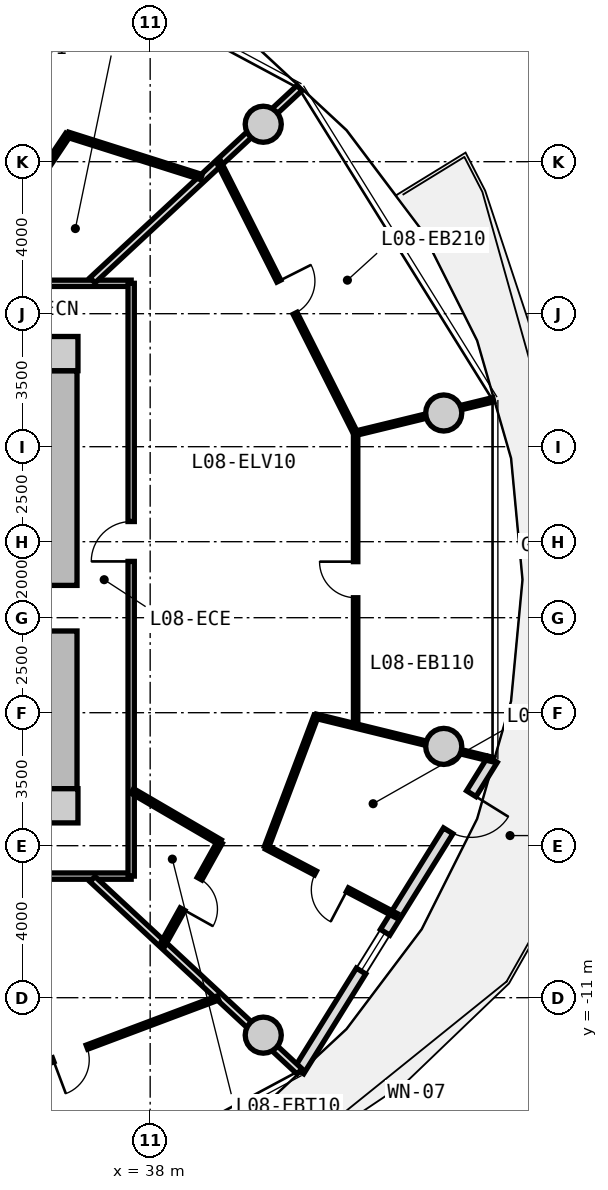
"""IFC4 building model, lengths in metres.
Left out: names, types, materials, properties, quantities, classifications, styles, units other than length and angle.
Written with IfcOpenShell. Run it as: python <this file> out.ifc"""

import sys

from ifc_helpers import new_model, si_unit, direction, frame, frame_2d, origin, origin_2d, place, context, subcontext, project, spatial, rectangle, circle, extrude, source, transform, mapped, element, fill, save


model = new_model("IFC4")
c1 = context("Model", 3, precision=1e-05, world=origin(), true_north=direction((0.0, 1.0)))
c2 = subcontext(c1, "Body", "Model", "MODEL_VIEW")
j1 = project(units=[si_unit("LENGTHUNIT", "METRE"), si_unit("PLANEANGLEUNIT", "RADIAN")], contexts=[c1])
p1 = place(None, origin())
s1 = spatial("IfcSite", under=j1, at=p1, CompositionType="ELEMENT")
p2 = place(p1, origin())
s2 = spatial("IfcBuilding", under=s1, at=p2, CompositionType="ELEMENT")
p3 = place(p2, frame((0.0, 0.0, 30.75)))
s3 = spatial("IfcBuildingStorey", under=s2, at=p3, CompositionType="ELEMENT", Elevation=30.75)
m1 = source(origin(), c2, "Body", "SweptSolid", [
    extrude(rectangle(XDim=0.9, YDim=0.9, at=origin_2d()), origin(), (0.0, 0.0, 1.0), 3.05),
])
for number, where, z_axis, x_axis in (
    (1, (35.65, -5.95, 0.0), (0.0, 0.0, 1.0), (1.0, 0.0, 0.0)),
    (2, (35.65, 5.95, 0.0), (0.0, 0.0, 1.0), (1.0, 0.0, 0.0)),
):
    element("IfcColumn", number, at=place(p3, frame(where, z_axis=z_axis, x_axis=x_axis)), inside=s3, PredefinedType="COLUMN", context=c2, shape_type="MappedRepresentation", body=[
        mapped(m1, transform((0.0, 0.0, 0.0), x_axis=(1.0, 0.0, 0.0), y_axis=(0.0, 1.0, 0.0), z_axis=(0.0, 0.0, 1.0), scale=1.0)),
    ])
m2 = source(origin(), c2, "Body", "SweptSolid", [
    extrude(rectangle(XDim=11.0, YDim=0.85, at=frame_2d((5.5, 0.0))), origin(), (0.0, 0.0, 1.0), 2.79),
])
p4 = place(p3, frame((35.65, 5.5, 0.0), z_axis=(0.0, 0.0, 1.0), x_axis=(0.0, -1.0, 0.0)))
e3 = element("IfcWall", 3, at=p4, inside=s3, PredefinedType="SHEAR", context=c2, shape_type="MappedRepresentation", body=[
    mapped(m2, transform((0.0, 0.0, 0.0), x_axis=(1.0, 0.0, 0.0), y_axis=(0.0, 1.0, 0.0), z_axis=(0.0, 0.0, 1.0), scale=1.0)),
])
p5 = place(p4, frame((5.65, 0.0, 0.0)))
e4 = element("IfcOpeningElement", 4, at=p5, cuts=e3, PredefinedType="OPENING", context=c2, shape_type="SweptSolid", body=[
    extrude(rectangle(XDim=1.2, YDim=2.15, at=frame_2d((0.6, 1.075))), frame((0.0, 0.435, 0.0), z_axis=(0.0, -1.0, 0.0), x_axis=(1.0, 0.0, 0.0)), (0.0, 0.0, 1.0), 0.87),
])
m3 = source(origin(), c2, "Body", "SweptSolid", [
    extrude(circle(Radius=0.475, at=origin_2d()), origin(), (0.0, 0.0, 1.0), 3.05),
])
for number, where, z_axis, x_axis in (
    (5, (45.725, 4.387, 0.0), (0.0, 0.0, 1.0), (1.0, 0.0, 0.0)),
    (6, (40.975, 11.985, 0.0), (0.0, 0.0, 1.0), (1.0, 0.0, 0.0)),
    (7, (40.975, -11.985, 0.0), (0.0, 0.0, 1.0), (1.0, 0.0, 0.0)),
    (8, (45.725, -4.387, 0.0), (0.0, 0.0, 1.0), (1.0, 0.0, 0.0)),
):
    element("IfcColumn", number, at=place(p3, frame(where, z_axis=z_axis, x_axis=x_axis)), inside=s3, PredefinedType="COLUMN", context=c2, shape_type="MappedRepresentation", body=[
        mapped(m3, transform((0.0, 0.0, 0.0), x_axis=(1.0, 0.0, 0.0), y_axis=(0.0, 1.0, 0.0), z_axis=(0.0, 0.0, 1.0), scale=1.0)),
    ])
m4 = source(origin(), c2, "Body", "SweptSolid", [
    extrude(rectangle(XDim=9.649, YDim=0.29, at=frame_2d((4.824, 0.0))), origin(), (0.0, 0.0, 1.0), 2.79),
])
p6 = place(p3, frame((47.01, -4.731, 0.0), z_axis=(0.0, 0.0, 1.0), x_axis=(-0.527909458386, -0.849300655684, 0.0)))
e9 = element("IfcWall", 9, at=p6, inside=s3, PredefinedType="SOLIDWALL", context=c2, shape_type="MappedRepresentation", body=[
    mapped(m4, transform((0.0, 0.0, 0.0), x_axis=(1.0, 0.0, 0.0), y_axis=(0.0, 1.0, 0.0), z_axis=(0.0, 0.0, 1.0), scale=1.0)),
])
p7 = place(p6, frame((1.06, 0.0, 0.0)))
e10 = element("IfcOpeningElement", 10, at=p7, cuts=e9, PredefinedType="OPENING", context=c2, shape_type="SweptSolid", body=[
    extrude(rectangle(XDim=1.15, YDim=2.25, at=frame_2d((0.575, 1.125))), frame((0.0, 0.155, 0.0), z_axis=(0.0, -1.0, 0.0), x_axis=(1.0, 0.0, 0.0)), (0.0, 0.0, 1.0), 0.31),
])
p8 = place(p6, frame((5.354, 0.0, 0.85)))
e11 = element("IfcOpeningElement", 11, at=p8, cuts=e9, PredefinedType="OPENING", context=c2, shape_type="SweptSolid", body=[
    extrude(rectangle(XDim=1.2, YDim=1.5, at=frame_2d((0.6, 0.75))), frame((0.0, 0.155, 0.0), z_axis=(0.0, -1.0, 0.0), x_axis=(1.0, 0.0, 0.0)), (0.0, 0.0, 1.0), 0.31),
])
m5 = source(origin(), c2, "Body", "SweptSolid", [
    extrude(rectangle(XDim=19.0, YDim=0.165, at=frame_2d((9.5, 0.0))), origin(), (0.0, 0.0, 1.0), 2.775),
])
p9 = place(p3, frame((18.5, 7.8, 0.0), z_axis=(0.0, 0.0, 1.0), x_axis=(1.0, 0.0, 0.0)))
e12 = element("IfcWall", 12, at=p9, inside=s3, PredefinedType="PARTITIONING", context=c2, shape_type="MappedRepresentation", body=[
    mapped(m5, transform((0.0, 0.0, 0.0), x_axis=(1.0, 0.0, 0.0), y_axis=(0.0, 1.0, 0.0), z_axis=(0.0, 0.0, 1.0), scale=1.0)),
])
p10 = place(p9, frame((10.523, 0.0, 0.0)))
e13 = element("IfcOpeningElement", 13, at=p10, cuts=e12, PredefinedType="OPENING", context=c2, shape_type="SweptSolid", body=[
    extrude(rectangle(XDim=0.92, YDim=2.1, at=frame_2d((0.46, 1.05))), frame((0.0, 0.093, 0.0), z_axis=(0.0, -1.0, 0.0), x_axis=(1.0, 0.0, 0.0)), (0.0, 0.0, 1.0), 0.185),
])
p11 = place(p9, frame((8.226, 0.0, 0.0)))
e14 = element("IfcOpeningElement", 14, at=p11, cuts=e12, PredefinedType="OPENING", context=c2, shape_type="SweptSolid", body=[
    extrude(rectangle(XDim=0.92, YDim=2.1, at=frame_2d((0.46, 1.05))), frame((0.0, 0.093, 0.0), z_axis=(0.0, -1.0, 0.0), x_axis=(1.0, 0.0, 0.0)), (0.0, 0.0, 1.0), 0.185),
])
p12 = place(p9, frame((3.506, 0.0, 0.0)))
e15 = element("IfcOpeningElement", 15, at=p12, cuts=e12, PredefinedType="OPENING", context=c2, shape_type="SweptSolid", body=[
    extrude(rectangle(XDim=1.25, YDim=2.2, at=frame_2d((0.625, 1.1))), frame((0.0, 0.093, 0.0), z_axis=(0.0, -1.0, 0.0), x_axis=(1.0, 0.0, 0.0)), (0.0, 0.0, 1.0), 0.185),
])
p13 = place(p9, frame((12.706, 0.0, 0.0)))
e16 = element("IfcOpeningElement", 16, at=p13, cuts=e12, PredefinedType="OPENING", context=c2, shape_type="SweptSolid", body=[
    extrude(rectangle(XDim=1.05, YDim=2.15, at=frame_2d((0.525, 1.075))), frame((0.0, 0.093, 0.0), z_axis=(0.0, -1.0, 0.0), x_axis=(1.0, 0.0, 0.0)), (0.0, 0.0, 1.0), 0.185),
])
p14 = place(p3, frame((37.5, -7.8, 0.0), z_axis=(0.0, 0.0, 1.0), x_axis=(-1.0, 0.0, 0.0)))
e17 = element("IfcWall", 17, at=p14, inside=s3, PredefinedType="PARTITIONING", context=c2, shape_type="MappedRepresentation", body=[
    mapped(m5, transform((0.0, 0.0, 0.0), x_axis=(1.0, 0.0, 0.0), y_axis=(0.0, 1.0, 0.0), z_axis=(0.0, 0.0, 1.0), scale=1.0)),
])
p15 = place(p14, frame((7.336, 0.0, 0.0)))
e18 = element("IfcOpeningElement", 18, at=p15, cuts=e17, PredefinedType="OPENING", context=c2, shape_type="SweptSolid", body=[
    extrude(rectangle(XDim=1.05, YDim=2.15, at=frame_2d((0.525, 1.075))), frame((0.0, 0.093, 0.0), z_axis=(0.0, -1.0, 0.0), x_axis=(1.0, 0.0, 0.0)), (0.0, 0.0, 1.0), 0.185),
])
m6 = source(origin(), c2, "Body", "SweptSolid", [
    extrude(rectangle(XDim=15.6, YDim=0.165, at=frame_2d((7.8, 0.0))), origin(), (0.0, 0.0, 1.0), 2.775),
])
p16 = place(p3, frame((37.5, 7.8, 0.0), z_axis=(0.0, 0.0, 1.0), x_axis=(0.0, -1.0, 0.0)))
e19 = element("IfcWall", 19, at=p16, inside=s3, PredefinedType="PARTITIONING", context=c2, shape_type="MappedRepresentation", body=[
    mapped(m6, transform((0.0, 0.0, 0.0), x_axis=(1.0, 0.0, 0.0), y_axis=(0.0, 1.0, 0.0), z_axis=(0.0, 0.0, 1.0), scale=1.0)),
])
p17 = place(p16, frame((6.269, 0.0, 0.0)))
e20 = element("IfcOpeningElement", 20, at=p17, cuts=e19, PredefinedType="OPENING", context=c2, shape_type="SweptSolid", body=[
    extrude(rectangle(XDim=1.05, YDim=2.15, at=frame_2d((0.525, 1.075))), frame((0.0, 0.093, 0.0), z_axis=(0.0, -1.0, 0.0), x_axis=(1.0, 0.0, 0.0)), (0.0, 0.0, 1.0), 0.185),
])
m7 = source(origin(), c2, "Body", "SweptSolid", [
    extrude(rectangle(XDim=7.435, YDim=0.19, at=frame_2d((3.717, 0.0))), origin(), (0.0, 0.0, 1.0), 2.415),
])
p18 = place(p3, frame((36.483, -7.88, 0.0), z_axis=(0.0, 0.0, 1.0), x_axis=(0.732651956848, -0.680603489652, 0.0)))
e21 = element("IfcWall", 21, at=p18, inside=s3, PredefinedType="PARTITIONING", context=c2, shape_type="MappedRepresentation", body=[
    mapped(m7, transform((0.0, 0.0, 0.0), x_axis=(1.0, 0.0, 0.0), y_axis=(0.0, 1.0, 0.0), z_axis=(0.0, 0.0, 1.0), scale=1.0)),
])
m8 = source(origin(), c2, "Body", "SweptSolid", [
    extrude(rectangle(XDim=8.32, YDim=0.115, at=frame_2d((4.16, 0.0))), origin(), (0.0, 0.0, 1.0), 2.775),
])
p19 = place(p3, frame((31.997, -13.93, 0.0), z_axis=(0.0, 0.0, 1.0), x_axis=(0.936180763098, 0.351518959382, 0.0)))
e22 = element("IfcWall", 22, at=p19, inside=s3, PredefinedType="PARTITIONING", context=c2, shape_type="MappedRepresentation", body=[
    mapped(m8, transform((0.0, 0.0, 0.0), x_axis=(1.0, 0.0, 0.0), y_axis=(0.0, 1.0, 0.0), z_axis=(0.0, 0.0, 1.0), scale=1.0)),
])
p20 = place(p19, frame((3.685, 0.0, 0.0)))
e23 = element("IfcOpeningElement", 23, at=p20, cuts=e22, PredefinedType="OPENING", context=c2, shape_type="SweptSolid", body=[
    extrude(rectangle(XDim=0.95, YDim=2.1, at=frame_2d((0.475, 1.05))), frame((0.0, 0.067, 0.0), z_axis=(0.0, -1.0, 0.0), x_axis=(1.0, 0.0, 0.0)), (0.0, 0.0, 1.0), 0.135),
])
m9 = source(origin(), c2, "Body", "SweptSolid", [
    extrude(rectangle(XDim=7.435, YDim=0.19, at=frame_2d((3.717, 0.0))), origin(), (0.0, 0.0, 1.0), 2.225),
])
p21 = place(p3, frame((36.483, 7.88, 0.0), z_axis=(0.0, 0.0, 1.0), x_axis=(0.732651956848, 0.680603489652, 0.0)))
e24 = element("IfcWall", 24, at=p21, inside=s3, PredefinedType="PARTITIONING", context=c2, shape_type="MappedRepresentation", body=[
    mapped(m9, transform((0.0, 0.0, 0.0), x_axis=(1.0, 0.0, 0.0), y_axis=(0.0, 1.0, 0.0), z_axis=(0.0, 0.0, 1.0), scale=1.0)),
])
m10 = source(origin(), c2, "Body", "SweptSolid", [
    extrude(rectangle(XDim=7.709, YDim=0.115, at=frame_2d((3.855, 0.0))), origin(), (0.0, 0.0, 1.0), 2.775),
])
p22 = place(p3, frame((43.406, -3.855, 0.0), z_axis=(0.0, 0.0, 1.0), x_axis=(0.0, 1.0, 0.0)))
e25 = element("IfcWall", 25, at=p22, inside=s3, PredefinedType="PARTITIONING", context=c2, shape_type="MappedRepresentation", body=[
    mapped(m10, transform((0.0, 0.0, 0.0), x_axis=(1.0, 0.0, 0.0), y_axis=(0.0, 1.0, 0.0), z_axis=(0.0, 0.0, 1.0), scale=1.0)),
])
p23 = place(p22, frame((3.38, 0.0, 0.0)))
e26 = element("IfcOpeningElement", 26, at=p23, cuts=e25, PredefinedType="OPENING", context=c2, shape_type="SweptSolid", body=[
    extrude(rectangle(XDim=0.95, YDim=2.1, at=frame_2d((0.475, 1.05))), frame((0.0, 0.067, 0.0), z_axis=(0.0, -1.0, 0.0), x_axis=(1.0, 0.0, 0.0)), (0.0, 0.0, 1.0), 0.135),
])
m11 = source(origin(), c2, "Body", "SweptSolid", [
    extrude(rectangle(XDim=4.803, YDim=0.115, at=frame_2d((2.401, 0.0))), origin(), (0.0, 0.0, 1.0), 2.225),
])
p24 = place(p3, frame((42.364, -3.594, 0.0), z_axis=(0.0, 0.0, 1.0), x_axis=(0.97129155908, -0.237892217736, 0.0)))
e27 = element("IfcWall", 27, at=p24, inside=s3, PredefinedType="PARTITIONING", context=c2, shape_type="MappedRepresentation", body=[
    mapped(m11, transform((0.0, 0.0, 0.0), x_axis=(1.0, 0.0, 0.0), y_axis=(0.0, 1.0, 0.0), z_axis=(0.0, 0.0, 1.0), scale=1.0)),
])
m12 = source(origin(), c2, "Body", "SweptSolid", [
    extrude(rectangle(XDim=8.018, YDim=0.115, at=frame_2d((4.009, 0.0))), origin(), (0.0, 0.0, 1.0), 2.775),
])
p25 = place(p3, frame((43.404, 3.854, 0.0), z_axis=(0.0, 0.0, 1.0), x_axis=(-0.450134355233, 0.89296084026, 0.0)))
e28 = element("IfcWall", 28, at=p25, inside=s3, PredefinedType="PARTITIONING", context=c2, shape_type="MappedRepresentation", body=[
    mapped(m12, transform((0.0, 0.0, 0.0), x_axis=(1.0, 0.0, 0.0), y_axis=(0.0, 1.0, 0.0), z_axis=(0.0, 0.0, 1.0), scale=1.0)),
])
p26 = place(p25, frame((3.534, 0.0, 0.0)))
e29 = element("IfcOpeningElement", 29, at=p26, cuts=e28, PredefinedType="OPENING", context=c2, shape_type="SweptSolid", body=[
    extrude(rectangle(XDim=0.95, YDim=2.1, at=frame_2d((0.475, 1.05))), frame((0.0, 0.067, 0.0), z_axis=(0.0, -1.0, 0.0), x_axis=(1.0, 0.0, 0.0)), (0.0, 0.0, 1.0), 0.135),
])
m13 = source(origin(), c2, "Body", "SweptSolid", [
    extrude(rectangle(XDim=3.73, YDim=0.115, at=frame_2d((1.865, 0.0))), origin(), (0.0, 0.0, 1.0), 2.225),
])
p27 = place(p3, frame((43.404, 3.854, 0.0), z_axis=(0.0, 0.0, 1.0), x_axis=(0.971644038568, 0.236448434791, 0.0)))
e30 = element("IfcWall", 30, at=p27, inside=s3, PredefinedType="PARTITIONING", context=c2, shape_type="MappedRepresentation", body=[
    mapped(m13, transform((0.0, 0.0, 0.0), x_axis=(1.0, 0.0, 0.0), y_axis=(0.0, 1.0, 0.0), z_axis=(0.0, 0.0, 1.0), scale=1.0)),
])
m14 = source(origin(), c2, "Body", "SweptSolid", [
    extrude(rectangle(XDim=2.669, YDim=0.14, at=frame_2d((1.335, 0.0))), origin(), (0.0, 0.0, 1.0), 2.775),
])
p28 = place(p3, frame((37.53, -5.561, 0.0), z_axis=(0.0, 0.0, 1.0), x_axis=(0.86369928178, -0.50400749067, 0.0)))
e31 = element("IfcWall", 31, at=p28, inside=s3, PredefinedType="PARTITIONING", context=c2, shape_type="MappedRepresentation", body=[
    mapped(m14, transform((0.0, 0.0, 0.0), x_axis=(1.0, 0.0, 0.0), y_axis=(0.0, 1.0, 0.0), z_axis=(0.0, 0.0, 1.0), scale=1.0)),
])
m15 = source(origin(), c2, "Body", "SweptSolid", [
    extrude(rectangle(XDim=3.121, YDim=0.14, at=frame_2d((1.561, 0.0))), origin(), (0.0, 0.0, 1.0), 2.775),
])
p29 = place(p3, frame((39.836, -6.906, 0.0), z_axis=(0.0, 0.0, 1.0), x_axis=(-0.487302357327, -0.873233309342, 0.0)))
e32 = element("IfcWall", 32, at=p29, inside=s3, PredefinedType="PARTITIONING", context=c2, shape_type="MappedRepresentation", body=[
    mapped(m15, transform((0.0, 0.0, 0.0), x_axis=(1.0, 0.0, 0.0), y_axis=(0.0, 1.0, 0.0), z_axis=(0.0, 0.0, 1.0), scale=1.0)),
])
p30 = place(p29, frame((1.101, 0.0, 0.0)))
e33 = element("IfcOpeningElement", 33, at=p30, cuts=e32, PredefinedType="OPENING", context=c2, shape_type="SweptSolid", body=[
    extrude(rectangle(XDim=0.92, YDim=2.1, at=frame_2d((0.46, 1.05))), frame((0.0, 0.08, 0.0), z_axis=(0.0, -1.0, 0.0), x_axis=(1.0, 0.0, 0.0)), (0.0, 0.0, 1.0), 0.16),
])
m16 = source(origin(), c2, "Body", "SweptSolid", [
    extrude(rectangle(XDim=3.864, YDim=0.115, at=frame_2d((1.932, 0.0))), origin(), (0.0, 0.0, 1.0), 2.775),
])
p31 = place(p3, frame((41.06, -7.041, 0.0), z_axis=(0.0, 0.0, 1.0), x_axis=(0.885194959803, -0.465220252289, 0.0)))
e34 = element("IfcWall", 34, at=p31, inside=s3, PredefinedType="PARTITIONING", context=c2, shape_type="MappedRepresentation", body=[
    mapped(m16, transform((0.0, 0.0, 0.0), x_axis=(1.0, 0.0, 0.0), y_axis=(0.0, 1.0, 0.0), z_axis=(0.0, 0.0, 1.0), scale=1.0)),
])
p32 = place(p31, frame((1.457, 0.0, 0.0)))
e35 = element("IfcOpeningElement", 35, at=p32, cuts=e34, PredefinedType="OPENING", context=c2, shape_type="SweptSolid", body=[
    extrude(rectangle(XDim=0.95, YDim=2.1, at=frame_2d((0.475, 1.05))), frame((0.0, 0.067, 0.0), z_axis=(0.0, -1.0, 0.0), x_axis=(1.0, 0.0, 0.0)), (0.0, 0.0, 1.0), 0.135),
])
m17 = source(origin(), c2, "Body", "SweptSolid", [
    extrude(rectangle(XDim=3.685, YDim=0.115, at=frame_2d((1.843, 0.0))), origin(), (0.0, 0.0, 1.0), 2.775),
])
p33 = place(p3, frame((41.06, -7.041, 0.0), z_axis=(0.0, 0.0, 1.0), x_axis=(0.353503632997, 0.935433151785, 0.0)))
e36 = element("IfcWall", 36, at=p33, inside=s3, PredefinedType="PARTITIONING", context=c2, shape_type="MappedRepresentation", body=[
    mapped(m17, transform((0.0, 0.0, 0.0), x_axis=(1.0, 0.0, 0.0), y_axis=(0.0, 1.0, 0.0), z_axis=(0.0, 0.0, 1.0), scale=1.0)),
])
m18 = source(origin(), c2, "Body", "SweptSolid", [
    extrude(rectangle(XDim=4.668, YDim=0.14, at=frame_2d((2.334, 0.0))), origin(), (0.0, 0.0, 1.0), 2.775),
])
p34 = place(p3, frame((33.24, 7.83, 0.0), z_axis=(0.0, 0.0, 1.0), x_axis=(0.55615986029, 0.83107533341, 0.0)))
e37 = element("IfcWall", 37, at=p34, inside=s3, PredefinedType="PARTITIONING", context=c2, shape_type="MappedRepresentation", body=[
    mapped(m18, transform((0.0, 0.0, 0.0), x_axis=(1.0, 0.0, 0.0), y_axis=(0.0, 1.0, 0.0), z_axis=(0.0, 0.0, 1.0), scale=1.0)),
])
p35 = place(p34, frame((1.874, 0.0, 0.0)))
e38 = element("IfcOpeningElement", 38, at=p35, cuts=e37, PredefinedType="OPENING", context=c2, shape_type="SweptSolid", body=[
    extrude(rectangle(XDim=0.92, YDim=2.1, at=frame_2d((0.46, 1.05))), frame((0.0, 0.08, 0.0), z_axis=(0.0, -1.0, 0.0), x_axis=(1.0, 0.0, 0.0)), (0.0, 0.0, 1.0), 0.16),
])
m19 = source(origin(), c2, "Body", "SweptSolid", [
    extrude(rectangle(XDim=3.684, YDim=0.14, at=frame_2d((1.842, 0.0))), origin(), (0.0, 0.0, 1.0), 2.775),
])
p36 = place(p3, frame((35.836, 11.709, 0.0), z_axis=(0.0, 0.0, 1.0), x_axis=(0.953245538614, -0.302196861518, 0.0)))
e39 = element("IfcWall", 39, at=p36, inside=s3, PredefinedType="PARTITIONING", context=c2, shape_type="MappedRepresentation", body=[
    mapped(m19, transform((0.0, 0.0, 0.0), x_axis=(1.0, 0.0, 0.0), y_axis=(0.0, 1.0, 0.0), z_axis=(0.0, 0.0, 1.0), scale=1.0)),
])
m20 = source(origin(), c2, "Body", "SweptSolid", [
    extrude(rectangle(XDim=1.15, YDim=2.25, at=frame_2d((0.575, 1.125))), frame((0.0, 0.025, 0.0), z_axis=(0.0, -1.0, 0.0), x_axis=(1.0, 0.0, 0.0)), (0.0, 0.0, 1.0), 0.05),
])
p37 = place(p7, origin())
e40 = element("IfcDoor", 40, at=p37, inside=s3, OperationType="SINGLE_SWING_LEFT", PredefinedType="DOOR", context=c2, shape_type="MappedRepresentation", body=[
    mapped(m20, transform((0.0, 0.0, 0.0), x_axis=(1.0, 0.0, 0.0), y_axis=(0.0, 1.0, 0.0), z_axis=(0.0, 0.0, 1.0), scale=1.0)),
])
fill(e10, e40)
m21 = source(origin(), c2, "Body", "SweptSolid", [
    extrude(rectangle(XDim=1.2, YDim=1.5, at=frame_2d((0.6, 0.75))), frame((0.0, 0.03, 0.0), z_axis=(0.0, -1.0, 0.0), x_axis=(1.0, 0.0, 0.0)), (0.0, 0.0, 1.0), 0.06),
])
p38 = place(p8, origin())
e41 = element("IfcWindow", 41, at=p38, inside=s3, PartitioningType="SINGLE_PANEL", PredefinedType="WINDOW", context=c2, shape_type="MappedRepresentation", body=[
    mapped(m21, transform((0.0, 0.0, 0.0), x_axis=(1.0, 0.0, 0.0), y_axis=(0.0, 1.0, 0.0), z_axis=(0.0, 0.0, 1.0), scale=1.0)),
])
fill(e11, e41)
m22 = source(origin(), c2, "Body", "SweptSolid", [
    extrude(rectangle(XDim=1.2, YDim=2.15, at=frame_2d((0.6, 1.075))), frame((0.0, 0.025, 0.0), z_axis=(0.0, -1.0, 0.0), x_axis=(1.0, 0.0, 0.0)), (0.0, 0.0, 1.0), 0.05),
])
p39 = place(p5, frame((1.2, 0.0, 0.0), z_axis=(0.0, 0.0, 1.0), x_axis=(-1.0, 0.0, 0.0)))
e42 = element("IfcDoor", 42, at=p39, inside=s3, OperationType="SINGLE_SWING_RIGHT", PredefinedType="DOOR", context=c2, shape_type="MappedRepresentation", body=[
    mapped(m22, transform((0.0, 0.0, 0.0), x_axis=(1.0, 0.0, 0.0), y_axis=(0.0, 1.0, 0.0), z_axis=(0.0, 0.0, 1.0), scale=1.0)),
])
fill(e4, e42)
m23 = source(origin(), c2, "Body", "SweptSolid", [
    extrude(rectangle(XDim=0.95, YDim=2.1, at=frame_2d((0.475, 1.05))), frame((0.0, 0.025, 0.0), z_axis=(0.0, -1.0, 0.0), x_axis=(1.0, 0.0, 0.0)), (0.0, 0.0, 1.0), 0.05),
])
p40 = place(p20, frame((0.95, 0.0, 0.0), z_axis=(0.0, 0.0, 1.0), x_axis=(-1.0, 0.0, 0.0)))
e43 = element("IfcDoor", 43, at=p40, inside=s3, OperationType="SINGLE_SWING_RIGHT", PredefinedType="DOOR", context=c2, shape_type="MappedRepresentation", body=[
    mapped(m23, transform((0.0, 0.0, 0.0), x_axis=(1.0, 0.0, 0.0), y_axis=(0.0, 1.0, 0.0), z_axis=(0.0, 0.0, 1.0), scale=1.0)),
])
fill(e23, e43)
m24 = source(origin(), c2, "Body", "SweptSolid", [
    extrude(rectangle(XDim=1.05, YDim=2.15, at=frame_2d((0.525, 1.075))), frame((0.0, 0.025, 0.0), z_axis=(0.0, -1.0, 0.0), x_axis=(1.0, 0.0, 0.0)), (0.0, 0.0, 1.0), 0.05),
])
p41 = place(p17, frame((1.05, 0.0, 0.0), z_axis=(0.0, 0.0, 1.0), x_axis=(-1.0, 0.0, 0.0)))
e44 = element("IfcDoor", 44, at=p41, inside=s3, OperationType="SINGLE_SWING_LEFT", PredefinedType="DOOR", context=c2, shape_type="MappedRepresentation", body=[
    mapped(m24, transform((0.0, 0.0, 0.0), x_axis=(1.0, 0.0, 0.0), y_axis=(0.0, 1.0, 0.0), z_axis=(0.0, 0.0, 1.0), scale=1.0)),
])
fill(e20, e44)
m25 = source(origin(), c2, "Body", "SweptSolid", [
    extrude(rectangle(XDim=0.92, YDim=2.1, at=frame_2d((0.46, 1.05))), frame((0.0, 0.025, 0.0), z_axis=(0.0, -1.0, 0.0), x_axis=(1.0, 0.0, 0.0)), (0.0, 0.0, 1.0), 0.05),
])
p42 = place(p30, origin())
e45 = element("IfcDoor", 45, at=p42, inside=s3, OperationType="SINGLE_SWING_RIGHT", PredefinedType="DOOR", context=c2, shape_type="MappedRepresentation", body=[
    mapped(m25, transform((0.0, 0.0, 0.0), x_axis=(1.0, 0.0, 0.0), y_axis=(0.0, 1.0, 0.0), z_axis=(0.0, 0.0, 1.0), scale=1.0)),
])
fill(e33, e45)
p43 = place(p32, frame((0.95, 0.0, 0.0), z_axis=(0.0, 0.0, 1.0), x_axis=(-1.0, 0.0, 0.0)))
e46 = element("IfcDoor", 46, at=p43, inside=s3, OperationType="SINGLE_SWING_LEFT", PredefinedType="DOOR", context=c2, shape_type="MappedRepresentation", body=[
    mapped(m23, transform((0.0, 0.0, 0.0), x_axis=(1.0, 0.0, 0.0), y_axis=(0.0, 1.0, 0.0), z_axis=(0.0, 0.0, 1.0), scale=1.0)),
])
fill(e35, e46)
p44 = place(p23, origin())
e47 = element("IfcDoor", 47, at=p44, inside=s3, OperationType="SINGLE_SWING_RIGHT", PredefinedType="DOOR", context=c2, shape_type="MappedRepresentation", body=[
    mapped(m23, transform((0.0, 0.0, 0.0), x_axis=(1.0, 0.0, 0.0), y_axis=(0.0, 1.0, 0.0), z_axis=(0.0, 0.0, 1.0), scale=1.0)),
])
fill(e26, e47)
p45 = place(p26, frame((0.95, 0.0, 0.0), z_axis=(0.0, 0.0, 1.0), x_axis=(-1.0, 0.0, 0.0)))
e48 = element("IfcDoor", 48, at=p45, inside=s3, OperationType="SINGLE_SWING_LEFT", PredefinedType="DOOR", context=c2, shape_type="MappedRepresentation", body=[
    mapped(m23, transform((0.0, 0.0, 0.0), x_axis=(1.0, 0.0, 0.0), y_axis=(0.0, 1.0, 0.0), z_axis=(0.0, 0.0, 1.0), scale=1.0)),
])
fill(e29, e48)
save(model, sys.argv[1])
